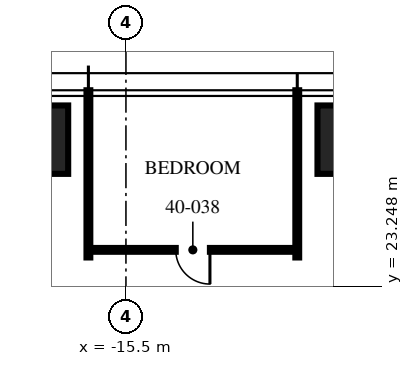
"""IFC4 building model, lengths in metres.
Left out: names, types, materials, properties, quantities, classifications, styles, units other than length and angle.
Written with IfcOpenShell. Run it as: python <this file> out.ifc"""

import sys

from ifc_helpers import new_model, si_unit, direction, frame, frame_2d, origin, origin_2d, place, context, subcontext, project, spatial, rectangle, extrude, element, fill, save


model = new_model("IFC4")
c1 = context("Model", 3, precision=1e-05, world=origin(), true_north=direction((0.0, 1.0)))
c2 = subcontext(c1, "Body", "Model", "MODEL_VIEW")
j1 = project(units=[si_unit("LENGTHUNIT", "METRE"), si_unit("PLANEANGLEUNIT", "RADIAN")], contexts=[c1])
p1 = place(None, origin())
s1 = spatial("IfcSite", under=j1, at=p1, CompositionType="ELEMENT")
p2 = place(p1, origin())
s2 = spatial("IfcBuilding", under=s1, at=p2, CompositionType="ELEMENT")
p3 = place(p2, frame((0.0, 0.0, 159.75)))
s3 = spatial("IfcBuildingStorey", under=s2, at=p3, CompositionType="ELEMENT", Elevation=159.75)
for number, where, z_axis, x_axis in (
    (1, (-18.32, 27.1, 0.0), (0.0, 0.0, 1.0), (1.0, 0.0, 0.0)),
    (2, (-9.16, 27.1, 0.0), (0.0, 0.0, 1.0), (1.0, 0.0, 0.0)),
):
    element("IfcColumn", number, at=place(p3, frame(where, z_axis=z_axis, x_axis=x_axis)), inside=s3, PredefinedType="COLUMN", context=c2, shape_type="SweptSolid", body=[
        extrude(rectangle(XDim=2.6, YDim=1.8, at=origin_2d()), origin(), (0.0, 0.0, 1.0), 3.75),
    ])
for number, where, z_axis, x_axis in (
    (3, (-10.992, 24.0, 0.0), (0.0, 0.0, 1.0), (0.0, 1.0, 0.0)),
    (4, (-16.488, 24.0, 0.0), (0.0, 0.0, 1.0), (0.0, 1.0, 0.0)),
):
    element("IfcWall", number, at=place(p3, frame(where, z_axis=z_axis, x_axis=x_axis)), inside=s3, PredefinedType="PARTITIONING", context=c2, shape_type="SweptSolid", body=[
        extrude(rectangle(XDim=4.4, YDim=0.1, at=frame_2d((2.2, 0.0))), origin(), (0.0, 0.0, 1.0), 2.81),
    ])
p4 = place(p3, frame((-10.992, 24.2, 0.0), z_axis=(0.0, 0.0, 1.0), x_axis=(-1.0, 0.0, 0.0)))
e5 = element("IfcWall", 5, at=p4, inside=s3, PredefinedType="PARTITIONING", context=c2, shape_type="SweptSolid", body=[
    extrude(rectangle(XDim=5.496, YDim=0.1, at=frame_2d((2.748, 0.0))), origin(), (0.0, 0.0, 1.0), 2.81),
])
p5 = place(p4, frame((2.298, 0.0, 0.0)))
e6 = element("IfcOpeningElement", 6, at=p5, cuts=e5, PredefinedType="OPENING", context=c2, shape_type="SweptSolid", body=[
    extrude(rectangle(XDim=0.9, YDim=2.1, at=frame_2d((0.45, 1.05))), frame((0.0, 0.06, 0.0), z_axis=(0.0, -1.0, 0.0), x_axis=(1.0, 0.0, 0.0)), (0.0, 0.0, 1.0), 0.12),
])
p6 = place(p5, origin())
e7 = element("IfcDoor", 7, at=p6, inside=s3, OperationType="SINGLE_SWING_LEFT", PredefinedType="DOOR", context=c2, shape_type="SweptSolid", body=[
    extrude(rectangle(XDim=0.9, YDim=2.1, at=frame_2d((0.45, 1.05))), frame((0.0, 0.025, 0.0), z_axis=(0.0, -1.0, 0.0), x_axis=(1.0, 0.0, 0.0)), (0.0, 0.0, 1.0), 0.05),
])
fill(e6, e7)
save(model, sys.argv[1])
